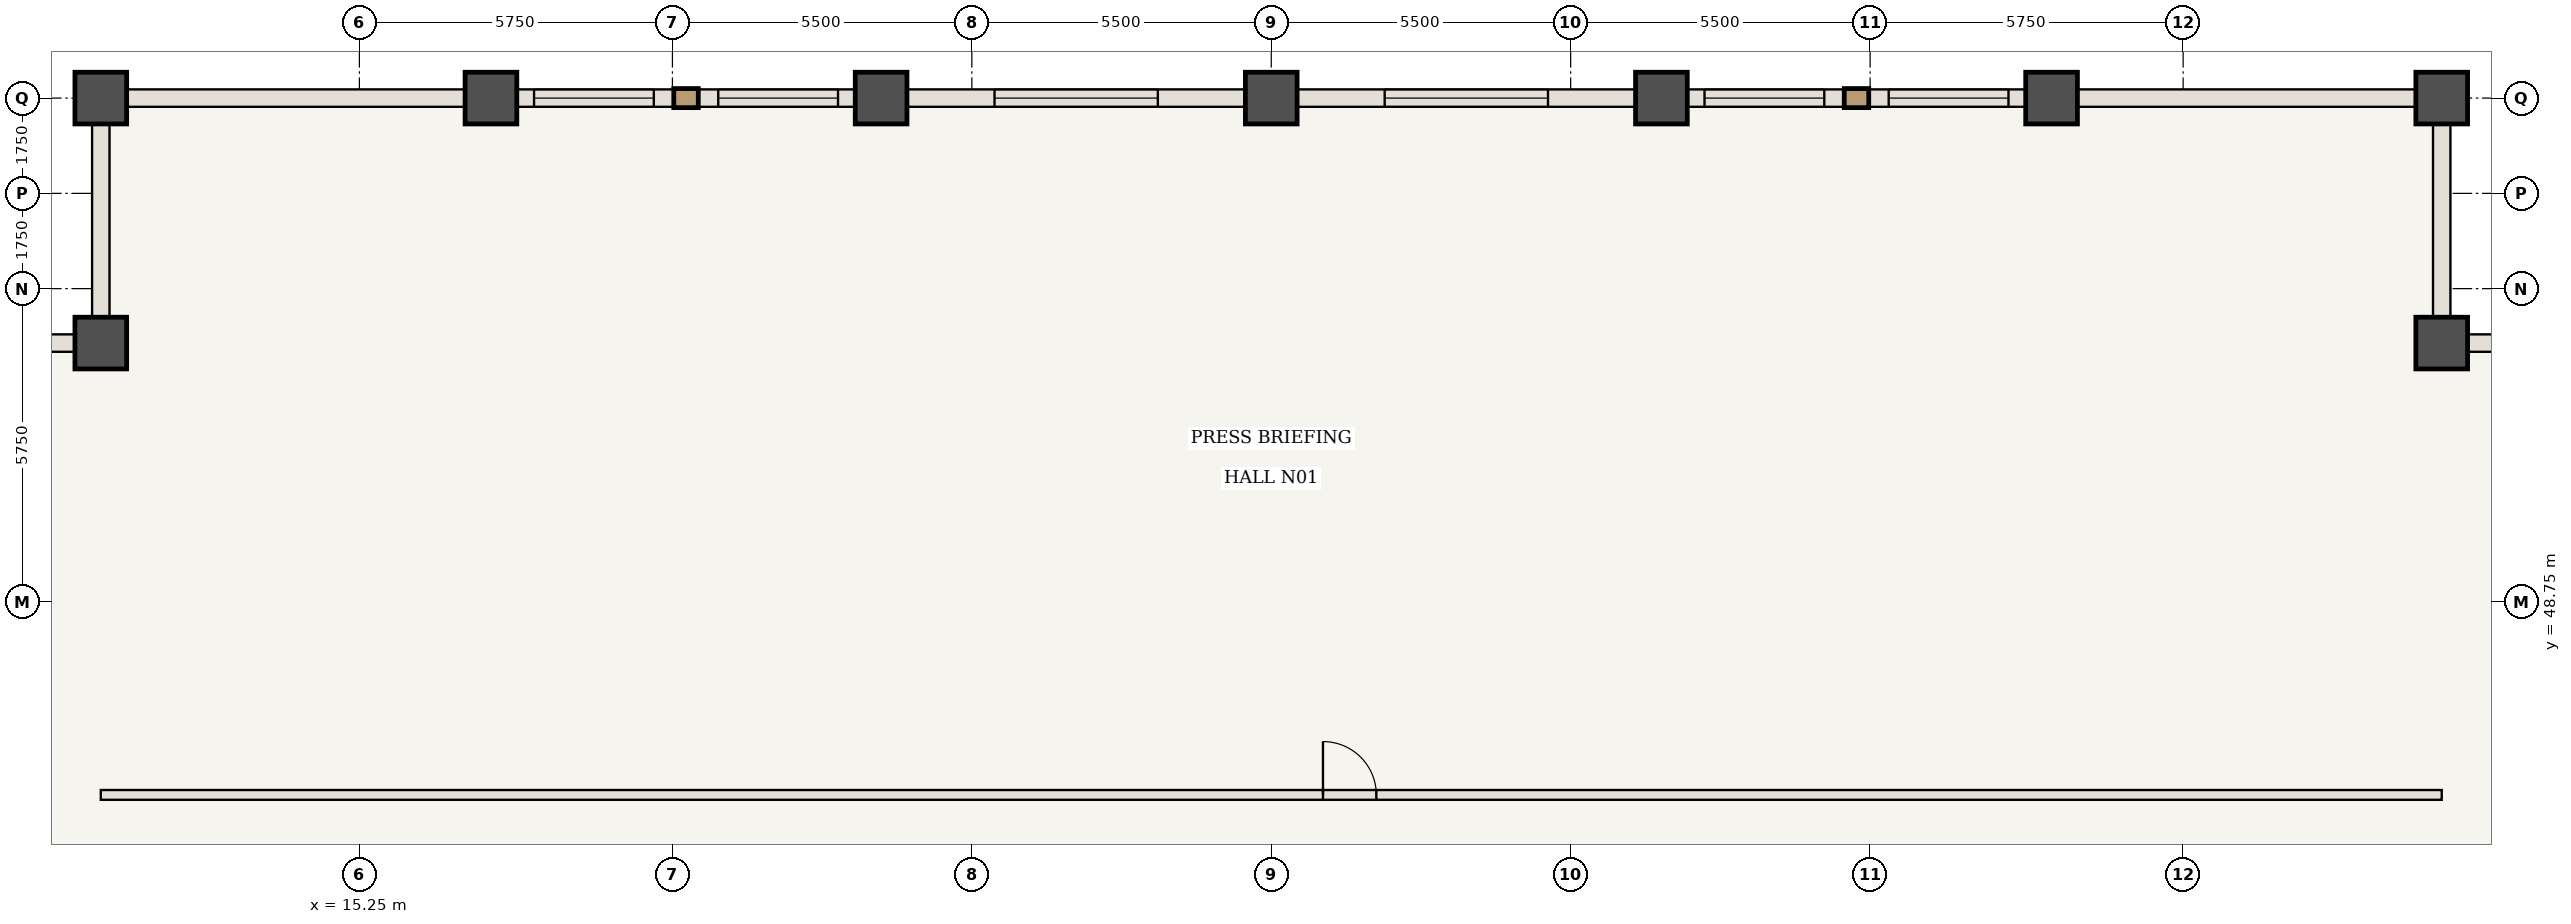
"""IFC4 building model, lengths in metres.
Left out: names, types, materials, properties, quantities, classifications, styles, units other than length and angle.
Written with IfcOpenShell. Run it as: python <this file> out.ifc"""

import sys

from ifc_helpers import new_model, si_unit, direction, frame, frame_2d, origin, origin_2d, place, context, subcontext, project, spatial, rectangle, extrude, element, fill, save


model = new_model("IFC4")
c1 = context("Model", 3, precision=1e-05, world=origin(), true_north=direction((0.0, 1.0)))
c2 = subcontext(c1, "Body", "Model", "MODEL_VIEW")
j1 = project(units=[si_unit("LENGTHUNIT", "METRE"), si_unit("PLANEANGLEUNIT", "RADIAN")], contexts=[c1])
p1 = place(None, origin())
s1 = spatial("IfcSite", under=j1, at=p1, CompositionType="ELEMENT")
p2 = place(p1, origin())
s2 = spatial("IfcBuilding", under=s1, at=p2, CompositionType="ELEMENT")
p3 = place(p2, frame((0.0, 0.0, 156.8)))
s3 = spatial("IfcBuildingStorey", under=s2, at=p3, CompositionType="ELEMENT", Elevation=156.8)
for number, where, z_axis, x_axis in (
    (1, (53.5, 53.5, 0.0), (0.0, 0.0, 1.0), (1.0, 0.0, 0.0)),
    (2, (53.5, 58.0, 0.0), (0.0, 0.0, 1.0), (1.0, 0.0, 0.0)),
    (3, (10.5, 58.0, 0.0), (0.0, 0.0, 1.0), (1.0, 0.0, 0.0)),
    (4, (10.5, 53.5, 0.0), (0.0, 0.0, 1.0), (1.0, 0.0, 0.0)),
    (5, (17.667, 58.0, 0.0), (0.0, 0.0, 1.0), (1.0, 0.0, 0.0)),
    (6, (24.833, 58.0, 0.0), (0.0, 0.0, 1.0), (1.0, 0.0, 0.0)),
    (7, (32.0, 58.0, 0.0), (0.0, 0.0, 1.0), (1.0, 0.0, 0.0)),
    (8, (39.167, 58.0, 0.0), (0.0, 0.0, 1.0), (1.0, 0.0, 0.0)),
    (9, (46.333, 58.0, 0.0), (0.0, 0.0, 1.0), (1.0, 0.0, 0.0)),
):
    element("IfcColumn", number, at=place(p3, frame(where, z_axis=z_axis, x_axis=x_axis)), inside=s3, PredefinedType="COLUMN", context=c2, shape_type="SweptSolid", body=[
        extrude(rectangle(XDim=0.95, YDim=0.95, at=origin_2d()), origin(), (0.0, 0.0, 1.0), 3.85),
    ])
p4 = place(p3, frame((10.5, 45.2, 0.0), z_axis=(0.0, 0.0, 1.0), x_axis=(1.0, 0.0, 0.0)))
e10 = element("IfcWall", 10, at=p4, inside=s3, PredefinedType="STANDARD", context=c2, shape_type="SweptSolid", body=[
    extrude(rectangle(XDim=43.0, YDim=0.18, at=frame_2d((21.5, 0.0))), origin(), (0.0, 0.0, 1.0), 3.685),
])
p5 = place(p4, frame((22.45, 0.0, 0.0)))
e11 = element("IfcOpeningElement", 11, at=p5, cuts=e10, PredefinedType="OPENING", context=c2, shape_type="SweptSolid", body=[
    extrude(rectangle(XDim=0.98, YDim=2.2, at=frame_2d((0.49, 1.1))), frame((0.0, 0.1, 0.0), z_axis=(0.0, -1.0, 0.0), x_axis=(1.0, 0.0, 0.0)), (0.0, 0.0, 1.0), 0.2),
])
p6 = place(p3, frame((10.5, 58.0, 0.0), z_axis=(0.0, 0.0, 1.0), x_axis=(1.0, 0.0, 0.0)))
e12 = element("IfcWall", 12, at=p6, inside=s3, PredefinedType="USERDEFINED", context=c2, shape_type="SweptSolid", body=[
    extrude(rectangle(XDim=7.167, YDim=0.32, at=frame_2d((3.583, 0.0))), origin(), (0.0, 0.0, 1.0), 2.885),
])
p7 = place(p3, frame((17.667, 58.0, 0.0), z_axis=(0.0, 0.0, 1.0), x_axis=(1.0, 0.0, 0.0)))
e13 = element("IfcWall", 13, at=p7, inside=s3, PredefinedType="USERDEFINED", context=c2, shape_type="SweptSolid", body=[
    extrude(rectangle(XDim=7.167, YDim=0.32, at=frame_2d((3.583, 0.0))), origin(), (0.0, 0.0, 1.0), 2.885),
])
p8 = place(p7, frame((0.792, 0.0, 0.85)))
e14 = element("IfcOpeningElement", 14, at=p8, cuts=e13, PredefinedType="OPENING", context=c2, shape_type="SweptSolid", body=[
    extrude(rectangle(XDim=2.2, YDim=1.835, at=frame_2d((1.1, 0.917))), frame((0.0, 0.17, 0.0), z_axis=(0.0, -1.0, 0.0), x_axis=(1.0, 0.0, 0.0)), (0.0, 0.0, 1.0), 0.34),
])
p9 = place(p7, frame((4.175, 0.0, 0.85)))
e15 = element("IfcOpeningElement", 15, at=p9, cuts=e13, PredefinedType="OPENING", context=c2, shape_type="SweptSolid", body=[
    extrude(rectangle(XDim=2.2, YDim=1.835, at=frame_2d((1.1, 0.917))), frame((0.0, 0.17, 0.0), z_axis=(0.0, -1.0, 0.0), x_axis=(1.0, 0.0, 0.0)), (0.0, 0.0, 1.0), 0.34),
])
p10 = place(p3, frame((24.833, 58.0, 0.0), z_axis=(0.0, 0.0, 1.0), x_axis=(1.0, 0.0, 0.0)))
e16 = element("IfcWall", 16, at=p10, inside=s3, PredefinedType="USERDEFINED", context=c2, shape_type="SweptSolid", body=[
    extrude(rectangle(XDim=7.167, YDim=0.32, at=frame_2d((3.583, 0.0))), origin(), (0.0, 0.0, 1.0), 2.885),
])
p11 = place(p10, frame((2.083, 0.0, 0.85)))
e17 = element("IfcOpeningElement", 17, at=p11, cuts=e16, PredefinedType="OPENING", context=c2, shape_type="SweptSolid", body=[
    extrude(rectangle(XDim=3.0, YDim=1.835, at=frame_2d((1.5, 0.917))), frame((0.0, 0.17, 0.0), z_axis=(0.0, -1.0, 0.0), x_axis=(1.0, 0.0, 0.0)), (0.0, 0.0, 1.0), 0.34),
])
p12 = place(p3, frame((32.0, 58.0, 0.0), z_axis=(0.0, 0.0, 1.0), x_axis=(1.0, 0.0, 0.0)))
e18 = element("IfcWall", 18, at=p12, inside=s3, PredefinedType="USERDEFINED", context=c2, shape_type="SweptSolid", body=[
    extrude(rectangle(XDim=7.167, YDim=0.32, at=frame_2d((3.583, 0.0))), origin(), (0.0, 0.0, 1.0), 2.885),
])
p13 = place(p12, frame((2.083, 0.0, 0.85)))
e19 = element("IfcOpeningElement", 19, at=p13, cuts=e18, PredefinedType="OPENING", context=c2, shape_type="SweptSolid", body=[
    extrude(rectangle(XDim=3.0, YDim=1.835, at=frame_2d((1.5, 0.917))), frame((0.0, 0.17, 0.0), z_axis=(0.0, -1.0, 0.0), x_axis=(1.0, 0.0, 0.0)), (0.0, 0.0, 1.0), 0.34),
])
p14 = place(p3, frame((39.167, 58.0, 0.0), z_axis=(0.0, 0.0, 1.0), x_axis=(1.0, 0.0, 0.0)))
e20 = element("IfcWall", 20, at=p14, inside=s3, PredefinedType="USERDEFINED", context=c2, shape_type="SweptSolid", body=[
    extrude(rectangle(XDim=7.167, YDim=0.32, at=frame_2d((3.583, 0.0))), origin(), (0.0, 0.0, 1.0), 2.885),
])
p15 = place(p14, frame((0.792, 0.0, 0.85)))
e21 = element("IfcOpeningElement", 21, at=p15, cuts=e20, PredefinedType="OPENING", context=c2, shape_type="SweptSolid", body=[
    extrude(rectangle(XDim=2.2, YDim=1.835, at=frame_2d((1.1, 0.917))), frame((0.0, 0.17, 0.0), z_axis=(0.0, -1.0, 0.0), x_axis=(1.0, 0.0, 0.0)), (0.0, 0.0, 1.0), 0.34),
])
p16 = place(p14, frame((4.175, 0.0, 0.85)))
e22 = element("IfcOpeningElement", 22, at=p16, cuts=e20, PredefinedType="OPENING", context=c2, shape_type="SweptSolid", body=[
    extrude(rectangle(XDim=2.2, YDim=1.835, at=frame_2d((1.1, 0.917))), frame((0.0, 0.17, 0.0), z_axis=(0.0, -1.0, 0.0), x_axis=(1.0, 0.0, 0.0)), (0.0, 0.0, 1.0), 0.34),
])
p17 = place(p3, frame((46.333, 58.0, 0.0), z_axis=(0.0, 0.0, 1.0), x_axis=(1.0, 0.0, 0.0)))
e23 = element("IfcWall", 23, at=p17, inside=s3, PredefinedType="USERDEFINED", context=c2, shape_type="SweptSolid", body=[
    extrude(rectangle(XDim=7.167, YDim=0.32, at=frame_2d((3.583, 0.0))), origin(), (0.0, 0.0, 1.0), 2.885),
])
for number, where, z_axis, x_axis in (
    (24, (53.5, 53.5, 0.0), (0.0, 0.0, 1.0), (1.0, 0.0, 0.0)),
    (25, (53.5, 58.0, 0.0), (0.0, 0.0, 1.0), (0.0, -1.0, 0.0)),
    (26, (10.5, 53.5, 0.0), (0.0, 0.0, 1.0), (0.0, 1.0, 0.0)),
    (27, (6.0, 53.5, 0.0), (0.0, 0.0, 1.0), (1.0, 0.0, 0.0)),
):
    element("IfcWall", number, at=place(p3, frame(where, z_axis=z_axis, x_axis=x_axis)), inside=s3, PredefinedType="USERDEFINED", context=c2, shape_type="SweptSolid", body=[
        extrude(rectangle(XDim=4.5, YDim=0.32, at=frame_2d((2.25, 0.0))), origin(), (0.0, 0.0, 1.0), 2.885),
    ])
p18 = place(p5, origin())
e28 = element("IfcDoor", 28, at=p18, inside=s3, OperationType="SINGLE_SWING_LEFT", PredefinedType="DOOR", context=c2, shape_type="SweptSolid", body=[
    extrude(rectangle(XDim=0.98, YDim=2.2, at=frame_2d((0.49, 1.1))), frame((0.0, 0.025, 0.0), z_axis=(0.0, -1.0, 0.0), x_axis=(1.0, 0.0, 0.0)), (0.0, 0.0, 1.0), 0.05),
])
fill(e11, e28)
p19 = place(p8, origin())
e29 = element("IfcWindow", 29, at=p19, inside=s3, PartitioningType="SINGLE_PANEL", PredefinedType="WINDOW", context=c2, shape_type="SweptSolid", body=[
    extrude(rectangle(XDim=2.2, YDim=1.835, at=frame_2d((1.1, 0.917))), frame((0.0, 0.03, 0.0), z_axis=(0.0, -1.0, 0.0), x_axis=(1.0, 0.0, 0.0)), (0.0, 0.0, 1.0), 0.06),
])
fill(e14, e29)
p20 = place(p9, origin())
e30 = element("IfcWindow", 30, at=p20, inside=s3, PartitioningType="SINGLE_PANEL", PredefinedType="WINDOW", context=c2, shape_type="SweptSolid", body=[
    extrude(rectangle(XDim=2.2, YDim=1.835, at=frame_2d((1.1, 0.917))), frame((0.0, 0.03, 0.0), z_axis=(0.0, -1.0, 0.0), x_axis=(1.0, 0.0, 0.0)), (0.0, 0.0, 1.0), 0.06),
])
fill(e15, e30)
p21 = place(p11, origin())
e31 = element("IfcWindow", 31, at=p21, inside=s3, PartitioningType="SINGLE_PANEL", PredefinedType="WINDOW", context=c2, shape_type="SweptSolid", body=[
    extrude(rectangle(XDim=3.0, YDim=1.835, at=frame_2d((1.5, 0.917))), frame((0.0, 0.03, 0.0), z_axis=(0.0, -1.0, 0.0), x_axis=(1.0, 0.0, 0.0)), (0.0, 0.0, 1.0), 0.06),
])
fill(e17, e31)
p22 = place(p13, origin())
e32 = element("IfcWindow", 32, at=p22, inside=s3, PartitioningType="SINGLE_PANEL", PredefinedType="WINDOW", context=c2, shape_type="SweptSolid", body=[
    extrude(rectangle(XDim=3.0, YDim=1.835, at=frame_2d((1.5, 0.917))), frame((0.0, 0.03, 0.0), z_axis=(0.0, -1.0, 0.0), x_axis=(1.0, 0.0, 0.0)), (0.0, 0.0, 1.0), 0.06),
])
fill(e19, e32)
p23 = place(p15, origin())
e33 = element("IfcWindow", 33, at=p23, inside=s3, PartitioningType="SINGLE_PANEL", PredefinedType="WINDOW", context=c2, shape_type="SweptSolid", body=[
    extrude(rectangle(XDim=2.2, YDim=1.835, at=frame_2d((1.1, 0.917))), frame((0.0, 0.03, 0.0), z_axis=(0.0, -1.0, 0.0), x_axis=(1.0, 0.0, 0.0)), (0.0, 0.0, 1.0), 0.06),
])
fill(e21, e33)
p24 = place(p16, origin())
e34 = element("IfcWindow", 34, at=p24, inside=s3, PartitioningType="SINGLE_PANEL", PredefinedType="WINDOW", context=c2, shape_type="SweptSolid", body=[
    extrude(rectangle(XDim=2.2, YDim=1.835, at=frame_2d((1.1, 0.917))), frame((0.0, 0.03, 0.0), z_axis=(0.0, -1.0, 0.0), x_axis=(1.0, 0.0, 0.0)), (0.0, 0.0, 1.0), 0.06),
])
fill(e22, e34)
save(model, sys.argv[1])
